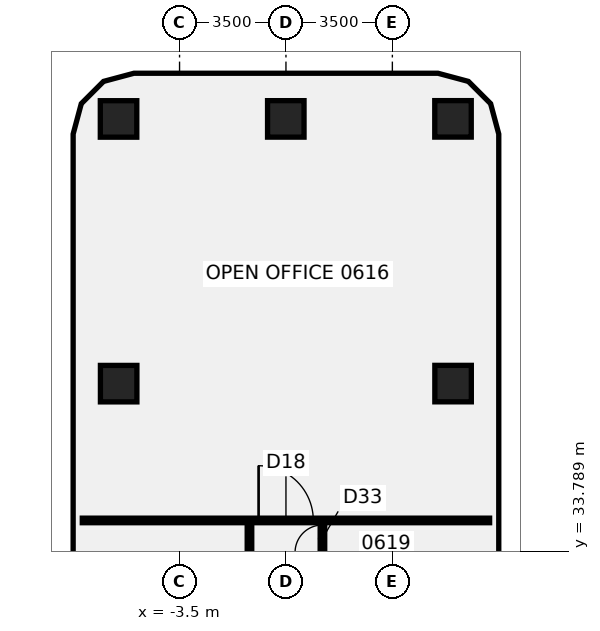
"""IFC4 building model, lengths in metres.
Left out: names, types, materials, properties, quantities, classifications, styles, units other than length and angle.
Written with IfcOpenShell. Run it as: python <this file> out.ifc"""

import sys

from ifc_helpers import new_model, si_unit, direction, frame, frame_2d, origin, origin_2d, place, context, subcontext, project, spatial, rectangle, extrude, element, fill, save


model = new_model("IFC4")
c1 = context("Model", 3, precision=1e-05, world=origin(), true_north=direction((0.0, 1.0)))
c2 = subcontext(c1, "Body", "Model", "MODEL_VIEW")
j1 = project(units=[si_unit("LENGTHUNIT", "METRE"), si_unit("PLANEANGLEUNIT", "RADIAN")], contexts=[c1])
p1 = place(None, origin())
s1 = spatial("IfcSite", under=j1, at=p1, CompositionType="ELEMENT")
p2 = place(p1, origin())
s2 = spatial("IfcBuilding", under=s1, at=p2, CompositionType="ELEMENT")
p3 = place(p2, frame((0.0, 0.0, 34.0)))
s3 = spatial("IfcBuildingStorey", under=s2, at=p3, CompositionType="ELEMENT", Elevation=34.0)
p4 = place(p3, frame((-5.503, 39.299, -0.106), z_axis=(-0.083550680281, -0.027435529026, 0.996125783007), x_axis=(0.996502412004, -0.000803418265, 0.083560142343)))
e1 = element("IfcColumn", 1, at=p4, inside=s3, PredefinedType="COLUMN", context=c2, shape_type="SweptSolid", body=[
    extrude(rectangle(XDim=1.2, YDim=1.2, at=origin_2d()), origin(), (0.0, 0.0, 1.0), 3.729),
])
p5 = place(p3, frame((5.497, 39.301, -0.106), z_axis=(-0.083998222647, 0.025926185634, 0.996128571767), x_axis=(-0.001767036613, -0.999663774736, 0.025869191378)))
e2 = element("IfcColumn", 2, at=p5, inside=s3, PredefinedType="COLUMN", context=c2, shape_type="SweptSolid", body=[
    extrude(rectangle(XDim=1.2, YDim=1.2, at=origin_2d()), origin(), (0.0, 0.0, 1.0), 3.729),
])
p6 = place(p3, frame((5.495, 48.008, -0.098), z_axis=(-0.125378166304, 0.010910971221, 0.992049024051), x_axis=(-0.000709202455, -0.999940253069, 0.010908131108)))
e3 = element("IfcColumn", 3, at=p6, inside=s3, PredefinedType="COLUMN", context=c2, shape_type="SweptSolid", body=[
    extrude(rectangle(XDim=1.2, YDim=1.2, at=origin_2d()), origin(), (0.0, 0.0, 1.0), 3.737),
])
p7 = place(p3, frame((-0.005, 48.007, -0.097), z_axis=(-0.125234240264, -0.015621598864, 0.992004209021), x_axis=(0.992126729346, -0.000995822842, 0.125234025945)))
e4 = element("IfcColumn", 4, at=p7, inside=s3, PredefinedType="COLUMN", context=c2, shape_type="SweptSolid", body=[
    extrude(rectangle(XDim=1.2, YDim=1.2, at=origin_2d()), origin(), (0.0, 0.0, 1.0), 3.735),
])
p8 = place(p3, frame((-5.506, 48.005, -0.089), z_axis=(-0.124883408699, -0.042085970542, 0.991278419676), x_axis=(0.992168641948, -0.002931384534, 0.124871105222)))
e5 = element("IfcColumn", 5, at=p8, inside=s3, PredefinedType="COLUMN", context=c2, shape_type="SweptSolid", body=[
    extrude(rectangle(XDim=1.2, YDim=1.2, at=origin_2d()), origin(), (0.0, 0.0, 1.0), 3.73),
])
p9 = place(p3, frame((-6.699, 34.8, 0.0), z_axis=(0.0, 0.0, 1.0), x_axis=(1.0, 0.0, 0.0)))
e6 = element("IfcWall", 6, at=p9, inside=s3, PredefinedType="PARTITIONING", context=c2, shape_type="SweptSolid", body=[
    extrude(rectangle(XDim=13.398, YDim=0.15, at=frame_2d((6.699, 0.0))), origin(), (0.0, 0.0, 1.0), 3.01),
])
p10 = place(p9, frame((5.799, 0.0, 0.0)))
e7 = element("IfcOpeningElement", 7, at=p10, cuts=e6, PredefinedType="OPENING", context=c2, shape_type="SweptSolid", body=[
    extrude(rectangle(XDim=1.8, YDim=2.1, at=frame_2d((0.9, 1.05))), frame((0.0, 0.085, 0.0), z_axis=(0.0, -1.0, 0.0), x_axis=(1.0, 0.0, 0.0)), (0.0, 0.0, 1.0), 0.17),
])
p11 = place(p3, frame((-1.2, 23.4, 0.0), z_axis=(0.0, 0.0, 1.0), x_axis=(0.0, 1.0, 0.0)))
e8 = element("IfcWall", 8, at=p11, inside=s3, PredefinedType="PARTITIONING", context=c2, shape_type="SweptSolid", body=[
    extrude(rectangle(XDim=11.34, YDim=0.15, at=frame_2d((5.67, 0.0))), origin(), (0.0, 0.0, 1.0), 3.01),
])
p12 = place(p11, frame((0.6, 0.0, 0.0)))
e9 = element("IfcOpeningElement", 9, at=p12, cuts=e8, PredefinedType="OPENING", context=c2, shape_type="SweptSolid", body=[
    extrude(rectangle(XDim=1.0, YDim=2.1, at=frame_2d((0.5, 1.05))), frame((0.0, 0.085, 0.0), z_axis=(0.0, -1.0, 0.0), x_axis=(1.0, 0.0, 0.0)), (0.0, 0.0, 1.0), 0.17),
])
p13 = place(p11, frame((8.55, 0.0, 0.0)))
e10 = element("IfcOpeningElement", 10, at=p13, cuts=e8, PredefinedType="OPENING", context=c2, shape_type="SweptSolid", body=[
    extrude(rectangle(XDim=1.8, YDim=2.1, at=frame_2d((0.9, 1.05))), frame((0.0, 0.085, 0.0), z_axis=(0.0, -1.0, 0.0), x_axis=(1.0, 0.0, 0.0)), (0.0, 0.0, 1.0), 0.17),
])
p14 = place(p11, frame((3.3, 0.0, 0.0)))
e11 = element("IfcOpeningElement", 11, at=p14, cuts=e8, PredefinedType="OPENING", context=c2, shape_type="SweptSolid", body=[
    extrude(rectangle(XDim=1.8, YDim=2.1, at=frame_2d((0.9, 1.05))), frame((0.0, 0.085, 0.0), z_axis=(0.0, -1.0, 0.0), x_axis=(1.0, 0.0, 0.0)), (0.0, 0.0, 1.0), 0.17),
])
p15 = place(p3, frame((1.2, 33.54, 0.0), z_axis=(0.0, 0.0, 1.0), x_axis=(0.0, 1.0, 0.0)))
e12 = element("IfcWall", 12, at=p15, inside=s3, PredefinedType="PARTITIONING", context=c2, shape_type="SweptSolid", body=[
    extrude(rectangle(XDim=1.2, YDim=0.15, at=frame_2d((0.6, 0.0))), origin(), (0.0, 0.0, 1.0), 3.01),
])
p16 = place(p15, frame((0.21, 0.0, 0.0)))
e13 = element("IfcOpeningElement", 13, at=p16, cuts=e12, PredefinedType="OPENING", context=c2, shape_type="SweptSolid", body=[
    extrude(rectangle(XDim=0.9, YDim=2.1, at=frame_2d((0.45, 1.05))), frame((0.0, 0.085, 0.0), z_axis=(0.0, -1.0, 0.0), x_axis=(1.0, 0.0, 0.0)), (0.0, 0.0, 1.0), 0.17),
])
p17 = place(p10, origin())
e14 = element("IfcDoor", 14, at=p17, inside=s3, OperationType="DOUBLE_DOOR_SINGLE_SWING", PredefinedType="DOOR", context=c2, shape_type="SweptSolid", body=[
    extrude(rectangle(XDim=1.8, YDim=2.1, at=frame_2d((0.9, 1.05))), frame((0.0, 0.025, 0.0), z_axis=(0.0, -1.0, 0.0), x_axis=(1.0, 0.0, 0.0)), (0.0, 0.0, 1.0), 0.05),
])
fill(e7, e14)
p18 = place(p16, frame((0.9, 0.0, 0.0), z_axis=(0.0, 0.0, 1.0), x_axis=(-1.0, 0.0, 0.0)))
e15 = element("IfcDoor", 15, at=p18, inside=s3, OperationType="SINGLE_SWING_RIGHT", PredefinedType="DOOR", context=c2, shape_type="SweptSolid", body=[
    extrude(rectangle(XDim=0.9, YDim=2.1, at=frame_2d((0.45, 1.05))), frame((0.0, 0.025, 0.0), z_axis=(0.0, -1.0, 0.0), x_axis=(1.0, 0.0, 0.0)), (0.0, 0.0, 1.0), 0.05),
])
fill(e13, e15)
save(model, sys.argv[1])
